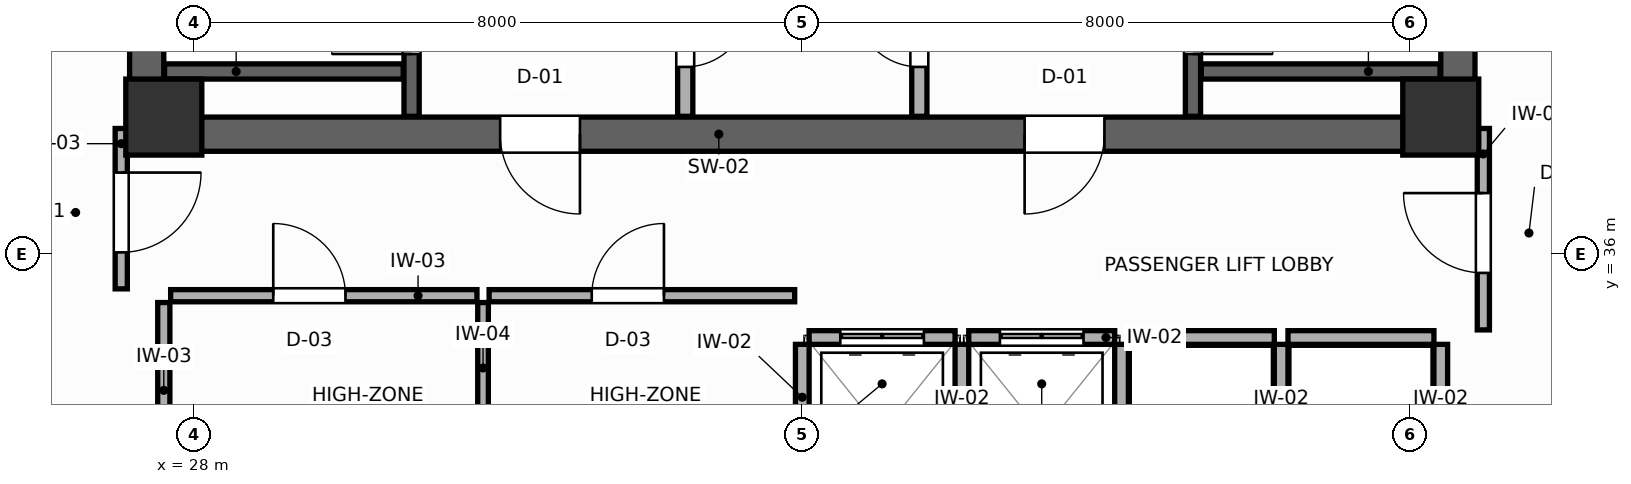
"""IFC4 building model, lengths in metres.
Left out: names, types, materials, properties, quantities, classifications, styles, units other than length and angle.
Written with IfcOpenShell. Run it as: python <this file> out.ifc"""

import sys

from ifc_helpers import new_model, si_unit, direction, frame, frame_2d, origin, origin_2d, place, context, subcontext, project, spatial, rectangle, extrude, source, transform, mapped, element, fill, save


model = new_model("IFC4")
c1 = context("Model", 3, precision=1e-05, world=origin(), true_north=direction((0.0, 1.0)))
c2 = subcontext(c1, "Body", "Model", "MODEL_VIEW")
j1 = project(units=[si_unit("LENGTHUNIT", "METRE"), si_unit("PLANEANGLEUNIT", "RADIAN")], contexts=[c1])
p1 = place(None, origin())
s1 = spatial("IfcSite", under=j1, at=p1, CompositionType="ELEMENT")
p2 = place(p1, origin())
s2 = spatial("IfcBuilding", under=s1, at=p2, CompositionType="ELEMENT")
p3 = place(p2, frame((0.0, 0.0, 197.4)))
s3 = spatial("IfcBuildingStorey", under=s2, at=p3, CompositionType="ELEMENT", Elevation=197.4)
p4 = place(p3, frame((27.15, 37.575, 0.0), z_axis=(0.0, 0.0, 1.0), x_axis=(1.0, 0.0, 0.0)))
e1 = element("IfcWall", 1, at=p4, inside=s3, PredefinedType="SHEAR", context=c2, shape_type="SweptSolid", body=[
    extrude(rectangle(XDim=17.7, YDim=0.45, at=frame_2d((8.85, 0.0))), origin(), (0.0, 0.0, 1.0), 3.6),
])
p5 = place(p4, frame((4.875, 0.0, 0.0)))
e2 = element("IfcOpeningElement", 2, at=p5, cuts=e1, PredefinedType="OPENING", context=c2, shape_type="SweptSolid", body=[
    extrude(rectangle(XDim=1.05, YDim=2.1, at=frame_2d((0.525, 1.05))), frame((0.0, 0.235, 0.0), z_axis=(0.0, -1.0, 0.0), x_axis=(1.0, 0.0, 0.0)), (0.0, 0.0, 1.0), 0.47),
])
p6 = place(p4, frame((11.775, 0.0, 0.0)))
e3 = element("IfcOpeningElement", 3, at=p6, cuts=e1, PredefinedType="OPENING", context=c2, shape_type="SweptSolid", body=[
    extrude(rectangle(XDim=1.05, YDim=2.1, at=frame_2d((0.525, 1.05))), frame((0.0, 0.235, 0.0), z_axis=(0.0, -1.0, 0.0), x_axis=(1.0, 0.0, 0.0)), (0.0, 0.0, 1.0), 0.47),
])
for number, where, z_axis, x_axis in (
    (4, (27.375, 37.8, 0.0), (0.0, 0.0, 1.0), (0.0, 1.0, 0.0)),
    (5, (44.625, 37.8, 0.0), (0.0, 0.0, 1.0), (0.0, 1.0, 0.0)),
):
    element("IfcWall", number, at=place(p3, frame(where, z_axis=z_axis, x_axis=x_axis)), inside=s3, PredefinedType="SHEAR", context=c2, shape_type="SweptSolid", body=[
        extrude(rectangle(XDim=9.0, YDim=0.45, at=frame_2d((4.5, 0.0))), origin(), (0.0, 0.0, 1.0), 3.6),
    ])
m1 = source(origin(), c2, "Body", "SweptSolid", [
    extrude(rectangle(XDim=1.0, YDim=1.0, at=origin_2d()), origin(), (0.0, 0.0, 1.0), 3.6),
])
for number, where, z_axis, x_axis in (
    (6, (27.6, 37.8, 0.0), (0.0, 0.0, 1.0), (1.0, 0.0, 0.0)),
    (7, (44.4, 37.8, 0.0), (0.0, 0.0, 1.0), (1.0, 0.0, 0.0)),
):
    element("IfcColumn", number, at=place(p3, frame(where, z_axis=z_axis, x_axis=x_axis)), inside=s3, PredefinedType="COLUMN", context=c2, shape_type="MappedRepresentation", body=[
        mapped(m1, transform((0.0, 0.0, 0.0), scale=1.0)),
    ])
p7 = place(p3, frame((30.86, 37.81, 0.0), z_axis=(0.0, 0.0, 1.0), x_axis=(0.0, 1.0, 0.0)))
e8 = element("IfcWall", 8, at=p7, inside=s3, PredefinedType="SHEAR", context=c2, shape_type="SweptSolid", body=[
    extrude(rectangle(XDim=8.98, YDim=0.2, at=frame_2d((4.49, 0.0))), origin(), (0.0, 0.0, 1.0), 3.6),
])
p8 = place(p7, frame((0.82, 0.0, 0.0)))
e9 = element("IfcOpeningElement", 9, at=p8, cuts=e8, PredefinedType="OPENING", context=c2, shape_type="SweptSolid", body=[
    extrude(rectangle(XDim=1.05, YDim=2.1, at=frame_2d((0.525, 1.05))), frame((0.0, 0.11, 0.0), z_axis=(0.0, -1.0, 0.0), x_axis=(1.0, 0.0, 0.0)), (0.0, 0.0, 1.0), 0.22),
])
p9 = place(p3, frame((27.61, 38.4, 0.0), z_axis=(0.0, 0.0, 1.0), x_axis=(1.0, 0.0, 0.0)))
e10 = element("IfcWall", 10, at=p9, inside=s3, PredefinedType="SHEAR", context=c2, shape_type="SweptSolid", body=[
    extrude(rectangle(XDim=3.14, YDim=0.2, at=frame_2d((1.57, 0.0))), origin(), (0.0, 0.0, 1.0), 3.6),
])
p10 = place(p3, frame((41.14, 37.81, 0.0), z_axis=(0.0, 0.0, 1.0), x_axis=(0.0, 1.0, 0.0)))
e11 = element("IfcWall", 11, at=p10, inside=s3, PredefinedType="SHEAR", context=c2, shape_type="SweptSolid", body=[
    extrude(rectangle(XDim=8.98, YDim=0.2, at=frame_2d((4.49, 0.0))), origin(), (0.0, 0.0, 1.0), 3.6),
])
p11 = place(p10, frame((0.82, 0.0, 0.0)))
e12 = element("IfcOpeningElement", 12, at=p11, cuts=e11, PredefinedType="OPENING", context=c2, shape_type="SweptSolid", body=[
    extrude(rectangle(XDim=1.05, YDim=2.1, at=frame_2d((0.525, 1.05))), frame((0.0, 0.11, 0.0), z_axis=(0.0, -1.0, 0.0), x_axis=(1.0, 0.0, 0.0)), (0.0, 0.0, 1.0), 0.22),
])
p12 = place(p3, frame((41.25, 38.4, 0.0), z_axis=(0.0, 0.0, 1.0), x_axis=(1.0, 0.0, 0.0)))
e13 = element("IfcWall", 13, at=p12, inside=s3, PredefinedType="SHEAR", context=c2, shape_type="SweptSolid", body=[
    extrude(rectangle(XDim=3.14, YDim=0.2, at=frame_2d((1.57, 0.0))), origin(), (0.0, 0.0, 1.0), 3.6),
])
p13 = place(p3, frame((34.46, 37.81, 0.0), z_axis=(0.0, 0.0, 1.0), x_axis=(0.0, 1.0, 0.0)))
e14 = element("IfcWall", 14, at=p13, inside=s3, PredefinedType="PARTITIONING", context=c2, shape_type="SweptSolid", body=[
    extrude(rectangle(XDim=8.98, YDim=0.2, at=frame_2d((4.49, 0.0))), origin(), (0.0, 0.0, 1.0), 3.26),
])
p14 = place(p13, frame((0.65, 0.0, 0.0)))
e15 = element("IfcOpeningElement", 15, at=p14, cuts=e14, PredefinedType="OPENING", context=c2, shape_type="SweptSolid", body=[
    extrude(rectangle(XDim=0.85, YDim=2.05, at=frame_2d((0.425, 1.025))), frame((0.0, 0.11, 0.0), z_axis=(0.0, -1.0, 0.0), x_axis=(1.0, 0.0, 0.0)), (0.0, 0.0, 1.0), 0.22),
])
p15 = place(p3, frame((37.54, 37.81, 0.0), z_axis=(0.0, 0.0, 1.0), x_axis=(0.0, 1.0, 0.0)))
e16 = element("IfcWall", 16, at=p15, inside=s3, PredefinedType="PARTITIONING", context=c2, shape_type="SweptSolid", body=[
    extrude(rectangle(XDim=8.98, YDim=0.2, at=frame_2d((4.49, 0.0))), origin(), (0.0, 0.0, 1.0), 3.26),
])
p16 = place(p15, frame((0.65, 0.0, 0.0)))
e17 = element("IfcOpeningElement", 17, at=p16, cuts=e16, PredefinedType="OPENING", context=c2, shape_type="SweptSolid", body=[
    extrude(rectangle(XDim=0.85, YDim=2.05, at=frame_2d((0.425, 1.025))), frame((0.0, 0.11, 0.0), z_axis=(0.0, -1.0, 0.0), x_axis=(1.0, 0.0, 0.0)), (0.0, 0.0, 1.0), 0.22),
])
p17 = place(p3, frame((36.09, 34.9, 0.0), z_axis=(0.0, 0.0, 1.0), x_axis=(1.0, 0.0, 0.0)))
e18 = element("IfcWall", 18, at=p17, inside=s3, PredefinedType="PARTITIONING", context=c2, shape_type="SweptSolid", body=[
    extrude(rectangle(XDim=1.92, YDim=0.18, at=frame_2d((0.96, 0.0))), origin(), (0.0, 0.0, 1.0), 3.26),
])
p18 = place(p17, frame((0.41, 0.0, 0.0)))
e19 = element("IfcOpeningElement", 19, at=p18, cuts=e18, PredefinedType="OPENING", context=c2, shape_type="SweptSolid", body=[
    extrude(rectangle(XDim=1.1, YDim=2.1, at=frame_2d((0.55, 1.05))), frame((0.0, 0.1, 0.0), z_axis=(0.0, -1.0, 0.0), x_axis=(1.0, 0.0, 0.0)), (0.0, 0.0, 1.0), 0.2),
])
p19 = place(p3, frame((36.0, 32.49, 0.0), z_axis=(0.0, 0.0, 1.0), x_axis=(0.0, 1.0, 0.0)))
e20 = element("IfcWall", 20, at=p19, inside=s3, PredefinedType="PARTITIONING", context=c2, shape_type="SweptSolid", body=[
    extrude(rectangle(XDim=2.32, YDim=0.18, at=frame_2d((1.16, 0.0))), origin(), (0.0, 0.0, 1.0), 3.26),
])
p20 = place(p3, frame((38.19, 34.9, 0.0), z_axis=(0.0, 0.0, 1.0), x_axis=(1.0, 0.0, 0.0)))
e21 = element("IfcWall", 21, at=p20, inside=s3, PredefinedType="PARTITIONING", context=c2, shape_type="SweptSolid", body=[
    extrude(rectangle(XDim=1.92, YDim=0.18, at=frame_2d((0.96, 0.0))), origin(), (0.0, 0.0, 1.0), 3.26),
])
p21 = place(p20, frame((0.41, 0.0, 0.0)))
e22 = element("IfcOpeningElement", 22, at=p21, cuts=e21, PredefinedType="OPENING", context=c2, shape_type="SweptSolid", body=[
    extrude(rectangle(XDim=1.1, YDim=2.1, at=frame_2d((0.55, 1.05))), frame((0.0, 0.1, 0.0), z_axis=(0.0, -1.0, 0.0), x_axis=(1.0, 0.0, 0.0)), (0.0, 0.0, 1.0), 0.2),
])
p22 = place(p3, frame((38.1, 32.49, 0.0), z_axis=(0.0, 0.0, 1.0), x_axis=(0.0, 1.0, 0.0)))
e23 = element("IfcWall", 23, at=p22, inside=s3, PredefinedType="PARTITIONING", context=c2, shape_type="SweptSolid", body=[
    extrude(rectangle(XDim=2.32, YDim=0.18, at=frame_2d((1.16, 0.0))), origin(), (0.0, 0.0, 1.0), 3.26),
])
p23 = place(p3, frame((40.29, 34.9, 0.0), z_axis=(0.0, 0.0, 1.0), x_axis=(1.0, 0.0, 0.0)))
e24 = element("IfcWall", 24, at=p23, inside=s3, PredefinedType="PARTITIONING", context=c2, shape_type="SweptSolid", body=[
    extrude(rectangle(XDim=1.92, YDim=0.18, at=frame_2d((0.96, 0.0))), origin(), (0.0, 0.0, 1.0), 3.26),
])
p24 = place(p3, frame((40.2, 32.49, 0.0), z_axis=(0.0, 0.0, 1.0), x_axis=(0.0, 1.0, 0.0)))
e25 = element("IfcWall", 25, at=p24, inside=s3, PredefinedType="PARTITIONING", context=c2, shape_type="SweptSolid", body=[
    extrude(rectangle(XDim=2.32, YDim=0.18, at=frame_2d((1.16, 0.0))), origin(), (0.0, 0.0, 1.0), 3.26),
])
p25 = place(p3, frame((42.39, 34.9, 0.0), z_axis=(0.0, 0.0, 1.0), x_axis=(1.0, 0.0, 0.0)))
e26 = element("IfcWall", 26, at=p25, inside=s3, PredefinedType="PARTITIONING", context=c2, shape_type="SweptSolid", body=[
    extrude(rectangle(XDim=1.92, YDim=0.18, at=frame_2d((0.96, 0.0))), origin(), (0.0, 0.0, 1.0), 3.26),
])
for number, where, z_axis, x_axis in (
    (27, (42.3, 32.49, 0.0), (0.0, 0.0, 1.0), (0.0, 1.0, 0.0)),
    (28, (44.4, 32.49, 0.0), (0.0, 0.0, 1.0), (0.0, 1.0, 0.0)),
):
    element("IfcWall", number, at=place(p3, frame(where, z_axis=z_axis, x_axis=x_axis)), inside=s3, PredefinedType="PARTITIONING", context=c2, shape_type="SweptSolid", body=[
        extrude(rectangle(XDim=2.32, YDim=0.18, at=frame_2d((1.16, 0.0))), origin(), (0.0, 0.0, 1.0), 3.26),
    ])
p26 = place(p3, frame((27.6, 33.05, 0.0), z_axis=(0.0, 0.0, 1.0), x_axis=(0.0, 1.0, 0.0)))
e29 = element("IfcWall", 29, at=p26, inside=s3, PredefinedType="PARTITIONING", context=c2, shape_type="SweptSolid", body=[
    extrude(rectangle(XDim=2.31, YDim=0.16, at=frame_2d((1.155, 0.0))), origin(), (0.0, 0.0, 1.0), 3.26),
])
p27 = place(p3, frame((31.8, 32.49, 0.0), z_axis=(0.0, 0.0, 1.0), x_axis=(0.0, 1.0, 0.0)))
e30 = element("IfcWall", 30, at=p27, inside=s3, PredefinedType="PARTITIONING", context=c2, shape_type="SweptSolid", body=[
    extrude(rectangle(XDim=2.87, YDim=0.14, at=frame_2d((1.435, 0.0))), origin(), (0.0, 0.0, 1.0), 3.26),
])
p28 = place(p3, frame((27.69, 35.45, 0.0), z_axis=(0.0, 0.0, 1.0), x_axis=(1.0, 0.0, 0.0)))
e31 = element("IfcWall", 31, at=p28, inside=s3, PredefinedType="PARTITIONING", context=c2, shape_type="SweptSolid", body=[
    extrude(rectangle(XDim=4.03, YDim=0.16, at=frame_2d((2.015, 0.0))), origin(), (0.0, 0.0, 1.0), 3.26),
])
p29 = place(p28, frame((1.35, 0.0, 0.0)))
e32 = element("IfcOpeningElement", 32, at=p29, cuts=e31, PredefinedType="OPENING", context=c2, shape_type="SweptSolid", body=[
    extrude(rectangle(XDim=0.95, YDim=2.05, at=frame_2d((0.475, 1.025))), frame((0.0, 0.09, 0.0), z_axis=(0.0, -1.0, 0.0), x_axis=(1.0, 0.0, 0.0)), (0.0, 0.0, 1.0), 0.18),
])
p30 = place(p3, frame((31.88, 35.45, 0.0), z_axis=(0.0, 0.0, 1.0), x_axis=(1.0, 0.0, 0.0)))
e33 = element("IfcWall", 33, at=p30, inside=s3, PredefinedType="PARTITIONING", context=c2, shape_type="SweptSolid", body=[
    extrude(rectangle(XDim=4.02, YDim=0.16, at=frame_2d((2.01, 0.0))), origin(), (0.0, 0.0, 1.0), 3.26),
])
p31 = place(p30, frame((1.35, 0.0, 0.0)))
e34 = element("IfcOpeningElement", 34, at=p31, cuts=e33, PredefinedType="OPENING", context=c2, shape_type="SweptSolid", body=[
    extrude(rectangle(XDim=0.95, YDim=2.05, at=frame_2d((0.475, 1.025))), frame((0.0, 0.09, 0.0), z_axis=(0.0, -1.0, 0.0), x_axis=(1.0, 0.0, 0.0)), (0.0, 0.0, 1.0), 0.18),
])
p32 = place(p3, frame((27.04, 35.54, 0.0), z_axis=(0.0, 0.0, 1.0), x_axis=(0.0, 1.0, 0.0)))
e35 = element("IfcWall", 35, at=p32, inside=s3, PredefinedType="PARTITIONING", context=c2, shape_type="SweptSolid", body=[
    extrude(rectangle(XDim=2.11, YDim=0.16, at=frame_2d((1.055, 0.0))), origin(), (0.0, 0.0, 1.0), 3.26),
])
p33 = place(p32, frame((0.48, 0.0, 0.0)))
e36 = element("IfcOpeningElement", 36, at=p33, cuts=e35, PredefinedType="OPENING", context=c2, shape_type="SweptSolid", body=[
    extrude(rectangle(XDim=1.05, YDim=2.1, at=frame_2d((0.525, 1.05))), frame((0.0, 0.09, 0.0), z_axis=(0.0, -1.0, 0.0), x_axis=(1.0, 0.0, 0.0)), (0.0, 0.0, 1.0), 0.18),
])
p34 = place(p3, frame((44.96, 35.0, 0.0), z_axis=(0.0, 0.0, 1.0), x_axis=(0.0, 1.0, 0.0)))
e37 = element("IfcWall", 37, at=p34, inside=s3, PredefinedType="PARTITIONING", context=c2, shape_type="SweptSolid", body=[
    extrude(rectangle(XDim=2.65, YDim=0.16, at=frame_2d((1.325, 0.0))), origin(), (0.0, 0.0, 1.0), 3.26),
])
p35 = place(p34, frame((0.75, 0.0, 0.0)))
e38 = element("IfcOpeningElement", 38, at=p35, cuts=e37, PredefinedType="OPENING", context=c2, shape_type="SweptSolid", body=[
    extrude(rectangle(XDim=1.05, YDim=2.1, at=frame_2d((0.525, 1.05))), frame((0.0, 0.09, 0.0), z_axis=(0.0, -1.0, 0.0), x_axis=(1.0, 0.0, 0.0)), (0.0, 0.0, 1.0), 0.18),
])
p36 = place(p8, origin())
e39 = element("IfcDoor", 39, at=p36, inside=s3, OperationType="SINGLE_SWING_LEFT", PredefinedType="DOOR", context=c2, shape_type="SweptSolid", body=[
    extrude(rectangle(XDim=1.05, YDim=2.1, at=frame_2d((0.525, 1.05))), frame((0.0, 0.025, 0.0), z_axis=(0.0, -1.0, 0.0), x_axis=(1.0, 0.0, 0.0)), (0.0, 0.0, 1.0), 0.05),
])
fill(e9, e39)
p37 = place(p11, frame((1.05, 0.0, 0.0), z_axis=(0.0, 0.0, 1.0), x_axis=(-1.0, 0.0, 0.0)))
e40 = element("IfcDoor", 40, at=p37, inside=s3, OperationType="SINGLE_SWING_RIGHT", PredefinedType="DOOR", context=c2, shape_type="SweptSolid", body=[
    extrude(rectangle(XDim=1.05, YDim=2.1, at=frame_2d((0.525, 1.05))), frame((0.0, 0.025, 0.0), z_axis=(0.0, -1.0, 0.0), x_axis=(1.0, 0.0, 0.0)), (0.0, 0.0, 1.0), 0.05),
])
fill(e12, e40)
p38 = place(p14, frame((0.85, 0.0, 0.0), z_axis=(0.0, 0.0, 1.0), x_axis=(-1.0, 0.0, 0.0)))
e41 = element("IfcDoor", 41, at=p38, inside=s3, OperationType="SINGLE_SWING_LEFT", PredefinedType="DOOR", context=c2, shape_type="SweptSolid", body=[
    extrude(rectangle(XDim=0.85, YDim=2.05, at=frame_2d((0.425, 1.025))), frame((0.0, 0.025, 0.0), z_axis=(0.0, -1.0, 0.0), x_axis=(1.0, 0.0, 0.0)), (0.0, 0.0, 1.0), 0.05),
])
fill(e15, e41)
p39 = place(p16, origin())
e42 = element("IfcDoor", 42, at=p39, inside=s3, OperationType="SINGLE_SWING_RIGHT", PredefinedType="DOOR", context=c2, shape_type="SweptSolid", body=[
    extrude(rectangle(XDim=0.85, YDim=2.05, at=frame_2d((0.425, 1.025))), frame((0.0, 0.025, 0.0), z_axis=(0.0, -1.0, 0.0), x_axis=(1.0, 0.0, 0.0)), (0.0, 0.0, 1.0), 0.05),
])
fill(e17, e42)
p40 = place(p18, origin())
e43 = element("IfcDoor", 43, at=p40, inside=s3, OperationType="DOUBLE_DOOR_SLIDING", PredefinedType="DOOR", context=c2, shape_type="SweptSolid", body=[
    extrude(rectangle(XDim=1.1, YDim=2.1, at=frame_2d((0.55, 1.05))), frame((0.0, 0.025, 0.0), z_axis=(0.0, -1.0, 0.0), x_axis=(1.0, 0.0, 0.0)), (0.0, 0.0, 1.0), 0.05),
])
fill(e19, e43)
p41 = place(p21, origin())
e44 = element("IfcDoor", 44, at=p41, inside=s3, OperationType="DOUBLE_DOOR_SLIDING", PredefinedType="DOOR", context=c2, shape_type="SweptSolid", body=[
    extrude(rectangle(XDim=1.1, YDim=2.1, at=frame_2d((0.55, 1.05))), frame((0.0, 0.025, 0.0), z_axis=(0.0, -1.0, 0.0), x_axis=(1.0, 0.0, 0.0)), (0.0, 0.0, 1.0), 0.05),
])
fill(e22, e44)
p42 = place(p29, origin())
e45 = element("IfcDoor", 45, at=p42, inside=s3, OperationType="SINGLE_SWING_LEFT", PredefinedType="DOOR", context=c2, shape_type="SweptSolid", body=[
    extrude(rectangle(XDim=0.95, YDim=2.05, at=frame_2d((0.475, 1.025))), frame((0.0, 0.025, 0.0), z_axis=(0.0, -1.0, 0.0), x_axis=(1.0, 0.0, 0.0)), (0.0, 0.0, 1.0), 0.05),
])
fill(e32, e45)
p43 = place(p31, origin())
e46 = element("IfcDoor", 46, at=p43, inside=s3, OperationType="SINGLE_SWING_RIGHT", PredefinedType="DOOR", context=c2, shape_type="SweptSolid", body=[
    extrude(rectangle(XDim=0.95, YDim=2.05, at=frame_2d((0.475, 1.025))), frame((0.0, 0.025, 0.0), z_axis=(0.0, -1.0, 0.0), x_axis=(1.0, 0.0, 0.0)), (0.0, 0.0, 1.0), 0.05),
])
fill(e34, e46)
p44 = place(p33, frame((1.05, 0.0, 0.0), z_axis=(0.0, 0.0, 1.0), x_axis=(-1.0, 0.0, 0.0)))
e47 = element("IfcDoor", 47, at=p44, inside=s3, OperationType="SINGLE_SWING_LEFT", PredefinedType="DOOR", context=c2, shape_type="SweptSolid", body=[
    extrude(rectangle(XDim=1.05, YDim=2.1, at=frame_2d((0.525, 1.05))), frame((0.0, 0.025, 0.0), z_axis=(0.0, -1.0, 0.0), x_axis=(1.0, 0.0, 0.0)), (0.0, 0.0, 1.0), 0.05),
])
fill(e36, e47)
p45 = place(p35, origin())
e48 = element("IfcDoor", 48, at=p45, inside=s3, OperationType="SINGLE_SWING_RIGHT", PredefinedType="DOOR", context=c2, shape_type="SweptSolid", body=[
    extrude(rectangle(XDim=1.05, YDim=2.1, at=frame_2d((0.525, 1.05))), frame((0.0, 0.025, 0.0), z_axis=(0.0, -1.0, 0.0), x_axis=(1.0, 0.0, 0.0)), (0.0, 0.0, 1.0), 0.05),
])
fill(e38, e48)
p46 = place(p5, frame((1.05, 0.0, 0.0), z_axis=(0.0, 0.0, 1.0), x_axis=(-1.0, 0.0, 0.0)))
e49 = element("IfcDoor", 49, at=p46, inside=s3, OperationType="SINGLE_SWING_LEFT", PredefinedType="DOOR", context=c2, shape_type="SweptSolid", body=[
    extrude(rectangle(XDim=1.05, YDim=2.1, at=frame_2d((0.525, 1.05))), frame((0.0, 0.025, 0.0), z_axis=(0.0, -1.0, 0.0), x_axis=(1.0, 0.0, 0.0)), (0.0, 0.0, 1.0), 0.05),
])
fill(e2, e49)
p47 = place(p6, frame((1.05, 0.0, 0.0), z_axis=(0.0, 0.0, 1.0), x_axis=(-1.0, 0.0, 0.0)))
e50 = element("IfcDoor", 50, at=p47, inside=s3, OperationType="SINGLE_SWING_RIGHT", PredefinedType="DOOR", context=c2, shape_type="SweptSolid", body=[
    extrude(rectangle(XDim=1.05, YDim=2.1, at=frame_2d((0.525, 1.05))), frame((0.0, 0.025, 0.0), z_axis=(0.0, -1.0, 0.0), x_axis=(1.0, 0.0, 0.0)), (0.0, 0.0, 1.0), 0.05),
])
fill(e3, e50)
save(model, sys.argv[1])
